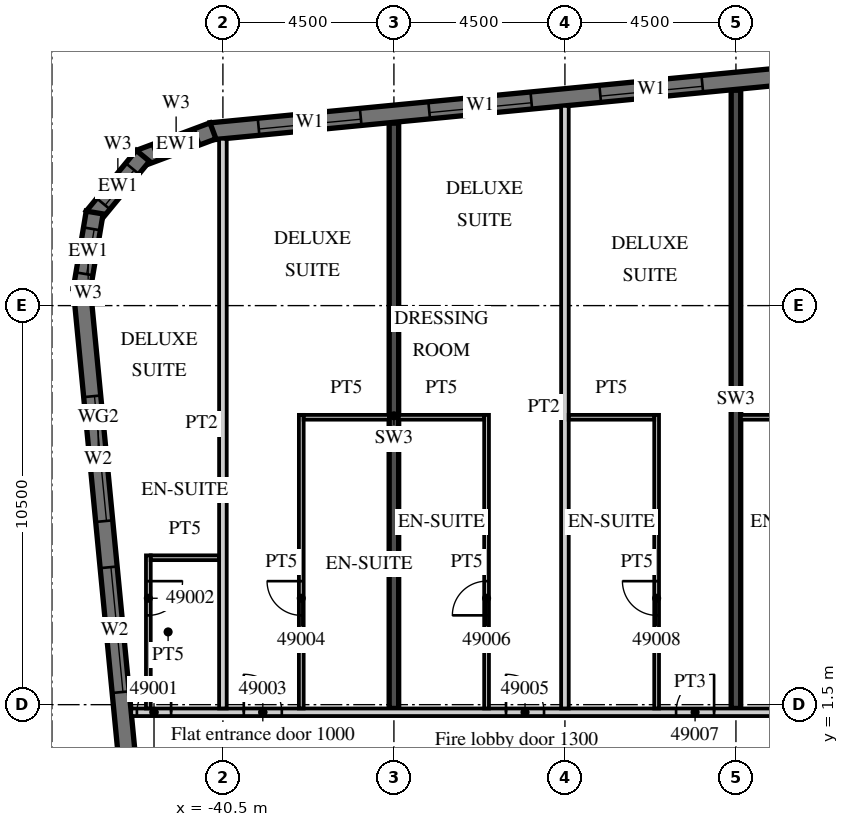
"""IFC4 building model, lengths in metres.
Left out: names, types, materials, properties, quantities, classifications, styles, units other than length and angle.
Written with IfcOpenShell. Run it as: python <this file> out.ifc"""

import sys

from ifc_helpers import new_model, si_unit, direction, frame, frame_2d, origin, place, context, subcontext, project, spatial, polyline, rectangle, outline, extrude, element, fill, save


model = new_model("IFC4")
c1 = context("Model", 3, precision=1e-05, world=origin(), true_north=direction((0.0, 1.0)))
c2 = subcontext(c1, "Body", "Model", "MODEL_VIEW")
j1 = project(units=[si_unit("LENGTHUNIT", "METRE"), si_unit("PLANEANGLEUNIT", "RADIAN")], contexts=[c1])
p1 = place(None, origin())
s1 = spatial("IfcSite", under=j1, at=p1, CompositionType="ELEMENT")
p2 = place(p1, origin())
s2 = spatial("IfcBuilding", under=s1, at=p2, CompositionType="ELEMENT")
p3 = place(p2, frame((0.0, 0.0, 203.2)))
s3 = spatial("IfcBuildingStorey", under=s2, at=p3, CompositionType="ELEMENT", Elevation=203.2)
p4 = place(p3, frame((-36.0, 1.4, 0.0), z_axis=(0.0, 0.0, 1.0), x_axis=(0.0, 1.0, 0.0)))
e1 = element("IfcWall", 1, at=p4, inside=s3, PredefinedType="SHEAR", context=c2, shape_type="SweptSolid", body=[
    extrude(rectangle(XDim=15.401, YDim=0.25, at=frame_2d((7.701, 0.0))), origin(), (0.0, 0.0, 1.0), 3.0),
])
p5 = place(p3, frame((-27.0, 1.4, 0.0), z_axis=(0.0, 0.0, 1.0), x_axis=(0.0, 1.0, 0.0)))
e2 = element("IfcWall", 2, at=p5, inside=s3, PredefinedType="SHEAR", context=c2, shape_type="SweptSolid", body=[
    extrude(rectangle(XDim=16.268, YDim=0.25, at=frame_2d((8.134, 0.0))), origin(), (0.0, 0.0, 1.0), 3.0),
])
p6 = place(p3, frame((-44.214, 12.466, 0.0), z_axis=(0.0, 0.0, 1.0), x_axis=(0.095847314626, -0.995396047952, 0.0)))
e3 = element("IfcWall", 3, at=p6, inside=s3, PredefinedType="SOLIDWALL", context=c2, shape_type="SweptSolid", body=[
    extrude(rectangle(XDim=34.0, YDim=0.45, at=frame_2d((17.0, 0.0))), origin(), (0.0, 0.0, 1.0), 3.0),
])
p7 = place(p6, frame((2.865, 0.0, 0.45)))
e4 = element("IfcOpeningElement", 4, at=p7, cuts=e3, PredefinedType="OPENING", context=c2, shape_type="SweptSolid", body=[
    extrude(rectangle(XDim=3.3, YDim=2.25, at=frame_2d((1.65, 1.125))), frame((0.0, 0.235, 0.0), z_axis=(0.0, -1.0, 0.0), x_axis=(1.0, 0.0, 0.0)), (0.0, 0.0, 1.0), 0.47),
])
p8 = place(p6, frame((7.386, 0.0, 0.45)))
e5 = element("IfcOpeningElement", 5, at=p8, cuts=e3, PredefinedType="OPENING", context=c2, shape_type="SweptSolid", body=[
    extrude(rectangle(XDim=3.3, YDim=2.25, at=frame_2d((1.65, 1.125))), frame((0.0, 0.235, 0.0), z_axis=(0.0, -1.0, 0.0), x_axis=(1.0, 0.0, 0.0)), (0.0, 0.0, 1.0), 0.47),
])
p9 = place(p3, frame((13.521, 21.817, 0.0), z_axis=(0.0, 0.0, 1.0), x_axis=(-0.995396508751, -0.095842529008, 0.0)))
e6 = element("IfcWall", 6, at=p9, inside=s3, PredefinedType="SOLIDWALL", context=c2, shape_type="SweptSolid", body=[
    extrude(rectangle(XDim=54.591, YDim=0.45, at=frame_2d((27.296, 0.0))), origin(), (0.0, 0.0, 1.0), 3.0),
])
p10 = place(p9, frame((0.91, 0.0, 0.45)))
e7 = element("IfcOpeningElement", 7, at=p10, cuts=e6, PredefinedType="OPENING", context=c2, shape_type="SweptSolid", body=[
    extrude(rectangle(XDim=2.7, YDim=2.25, at=frame_2d((1.35, 1.125))), frame((0.0, 0.235, 0.0), z_axis=(0.0, -1.0, 0.0), x_axis=(1.0, 0.0, 0.0)), (0.0, 0.0, 1.0), 0.47),
])
p11 = place(p9, frame((5.431, 0.0, 0.45)))
e8 = element("IfcOpeningElement", 8, at=p11, cuts=e6, PredefinedType="OPENING", context=c2, shape_type="SweptSolid", body=[
    extrude(rectangle(XDim=2.7, YDim=2.25, at=frame_2d((1.35, 1.125))), frame((0.0, 0.235, 0.0), z_axis=(0.0, -1.0, 0.0), x_axis=(1.0, 0.0, 0.0)), (0.0, 0.0, 1.0), 0.47),
])
p12 = place(p9, frame((9.952, 0.0, 0.45)))
e9 = element("IfcOpeningElement", 9, at=p12, cuts=e6, PredefinedType="OPENING", context=c2, shape_type="SweptSolid", body=[
    extrude(rectangle(XDim=2.7, YDim=2.25, at=frame_2d((1.35, 1.125))), frame((0.0, 0.235, 0.0), z_axis=(0.0, -1.0, 0.0), x_axis=(1.0, 0.0, 0.0)), (0.0, 0.0, 1.0), 0.47),
])
p13 = place(p9, frame((14.473, 0.0, 0.45)))
e10 = element("IfcOpeningElement", 10, at=p13, cuts=e6, PredefinedType="OPENING", context=c2, shape_type="SweptSolid", body=[
    extrude(rectangle(XDim=2.7, YDim=2.25, at=frame_2d((1.35, 1.125))), frame((0.0, 0.235, 0.0), z_axis=(0.0, -1.0, 0.0), x_axis=(1.0, 0.0, 0.0)), (0.0, 0.0, 1.0), 0.47),
])
p14 = place(p9, frame((18.994, 0.0, 0.45)))
e11 = element("IfcOpeningElement", 11, at=p14, cuts=e6, PredefinedType="OPENING", context=c2, shape_type="SweptSolid", body=[
    extrude(rectangle(XDim=2.7, YDim=2.25, at=frame_2d((1.35, 1.125))), frame((0.0, 0.235, 0.0), z_axis=(0.0, -1.0, 0.0), x_axis=(1.0, 0.0, 0.0)), (0.0, 0.0, 1.0), 0.47),
])
p15 = place(p9, frame((23.514, 0.0, 0.45)))
e12 = element("IfcOpeningElement", 12, at=p15, cuts=e6, PredefinedType="OPENING", context=c2, shape_type="SweptSolid", body=[
    extrude(rectangle(XDim=2.7, YDim=2.25, at=frame_2d((1.35, 1.125))), frame((0.0, 0.235, 0.0), z_axis=(0.0, -1.0, 0.0), x_axis=(1.0, 0.0, 0.0)), (0.0, 0.0, 1.0), 0.47),
])
p16 = place(p9, frame((28.035, 0.0, 0.45)))
e13 = element("IfcOpeningElement", 13, at=p16, cuts=e6, PredefinedType="OPENING", context=c2, shape_type="SweptSolid", body=[
    extrude(rectangle(XDim=2.7, YDim=2.25, at=frame_2d((1.35, 1.125))), frame((0.0, 0.235, 0.0), z_axis=(0.0, -1.0, 0.0), x_axis=(1.0, 0.0, 0.0)), (0.0, 0.0, 1.0), 0.47),
])
p17 = place(p9, frame((32.556, 0.0, 0.45)))
e14 = element("IfcOpeningElement", 14, at=p17, cuts=e6, PredefinedType="OPENING", context=c2, shape_type="SweptSolid", body=[
    extrude(rectangle(XDim=2.7, YDim=2.25, at=frame_2d((1.35, 1.125))), frame((0.0, 0.235, 0.0), z_axis=(0.0, -1.0, 0.0), x_axis=(1.0, 0.0, 0.0)), (0.0, 0.0, 1.0), 0.47),
])
p18 = place(p9, frame((37.077, 0.0, 0.45)))
e15 = element("IfcOpeningElement", 15, at=p18, cuts=e6, PredefinedType="OPENING", context=c2, shape_type="SweptSolid", body=[
    extrude(rectangle(XDim=2.7, YDim=2.25, at=frame_2d((1.35, 1.125))), frame((0.0, 0.235, 0.0), z_axis=(0.0, -1.0, 0.0), x_axis=(1.0, 0.0, 0.0)), (0.0, 0.0, 1.0), 0.47),
])
p19 = place(p9, frame((41.598, 0.0, 0.45)))
e16 = element("IfcOpeningElement", 16, at=p19, cuts=e6, PredefinedType="OPENING", context=c2, shape_type="SweptSolid", body=[
    extrude(rectangle(XDim=2.7, YDim=2.25, at=frame_2d((1.35, 1.125))), frame((0.0, 0.235, 0.0), z_axis=(0.0, -1.0, 0.0), x_axis=(1.0, 0.0, 0.0)), (0.0, 0.0, 1.0), 0.47),
])
p20 = place(p9, frame((46.118, 0.0, 0.45)))
e17 = element("IfcOpeningElement", 17, at=p20, cuts=e6, PredefinedType="OPENING", context=c2, shape_type="SweptSolid", body=[
    extrude(rectangle(XDim=2.7, YDim=2.25, at=frame_2d((1.35, 1.125))), frame((0.0, 0.235, 0.0), z_axis=(0.0, -1.0, 0.0), x_axis=(1.0, 0.0, 0.0)), (0.0, 0.0, 1.0), 0.47),
])
p21 = place(p9, frame((50.629, 0.0, 0.45)))
e18 = element("IfcOpeningElement", 18, at=p21, cuts=e6, PredefinedType="OPENING", context=c2, shape_type="SweptSolid", body=[
    extrude(rectangle(XDim=2.7, YDim=2.25, at=frame_2d((1.35, 1.125))), frame((0.0, 0.235, 0.0), z_axis=(0.0, -1.0, 0.0), x_axis=(1.0, 0.0, 0.0)), (0.0, 0.0, 1.0), 0.47),
])
p22 = place(p3, frame((-40.761, 16.598, 0.0), z_axis=(0.0, 0.0, 1.0), x_axis=(-0.936677599948, -0.350192909346, 0.0)))
e19 = element("IfcWall", 19, at=p22, inside=s3, PredefinedType="SOLIDWALL", context=c2, shape_type="SweptSolid", body=[
    extrude(outline(polyline([(0.0, -0.225), (2.071, -0.225), (1.95, 0.225), (0.121, 0.225), (0.0, -0.225)])), origin(), (0.0, 0.0, 1.0), 3.0),
])
p23 = place(p22, frame((0.435, 0.0, 0.45)))
e20 = element("IfcOpeningElement", 20, at=p23, cuts=e19, PredefinedType="OPENING", context=c2, shape_type="SweptSolid", body=[
    extrude(rectangle(XDim=1.2, YDim=2.25, at=frame_2d((0.6, 1.125))), frame((0.0, 0.235, 0.0), z_axis=(0.0, -1.0, 0.0), x_axis=(1.0, 0.0, 0.0)), (0.0, 0.0, 1.0), 0.47),
])
p24 = place(p3, frame((-42.606, 15.941, 0.0), z_axis=(0.0, 0.0, 1.0), x_axis=(-0.636116318187, -0.771593176315, 0.0)))
e21 = element("IfcWall", 21, at=p24, inside=s3, PredefinedType="SOLIDWALL", context=c2, shape_type="SweptSolid", body=[
    extrude(outline(polyline([(0.0, -0.225), (2.071, -0.225), (1.95, 0.225), (0.121, 0.225), (0.0, -0.225)])), origin(), (0.0, 0.0, 1.0), 3.0),
])
p25 = place(p24, frame((0.435, 0.0, 0.45)))
e22 = element("IfcOpeningElement", 22, at=p25, cuts=e21, PredefinedType="OPENING", context=c2, shape_type="SweptSolid", body=[
    extrude(rectangle(XDim=1.2, YDim=2.25, at=frame_2d((0.6, 1.125))), frame((0.0, 0.235, 0.0), z_axis=(0.0, -1.0, 0.0), x_axis=(1.0, 0.0, 0.0)), (0.0, 0.0, 1.0), 0.47),
])
p26 = place(p3, frame((-43.875, 14.449, 0.0), z_axis=(0.0, 0.0, 1.0), x_axis=(-0.164953448126, -0.986301353518, 0.0)))
e23 = element("IfcWall", 23, at=p26, inside=s3, PredefinedType="SOLIDWALL", context=c2, shape_type="SweptSolid", body=[
    extrude(outline(polyline([(0.0, -0.225), (2.071, -0.225), (1.95, 0.225), (0.121, 0.225), (0.0, -0.225)])), origin(), (0.0, 0.0, 1.0), 3.0),
])
p27 = place(p26, frame((0.435, 0.0, 0.45)))
e24 = element("IfcOpeningElement", 24, at=p27, cuts=e23, PredefinedType="OPENING", context=c2, shape_type="SweptSolid", body=[
    extrude(rectangle(XDim=1.2, YDim=2.25, at=frame_2d((0.6, 1.125))), frame((0.0, 0.235, 0.0), z_axis=(0.0, -1.0, 0.0), x_axis=(1.0, 0.0, 0.0)), (0.0, 0.0, 1.0), 0.47),
])
p28 = place(p3, frame((-42.913, 1.3, 0.0), z_axis=(0.0, 0.0, 1.0), x_axis=(1.0, 0.0, 0.0)))
e25 = element("IfcWall", 25, at=p28, inside=s3, PredefinedType="PARTITIONING", context=c2, shape_type="SweptSolid", body=[
    extrude(rectangle(XDim=29.413, YDim=0.2, at=frame_2d((14.707, 0.0))), origin(), (0.0, 0.0, 1.0), 3.0),
])
p29 = place(p28, frame((0.15, 0.0, 0.0)))
e26 = element("IfcOpeningElement", 26, at=p29, cuts=e25, PredefinedType="OPENING", context=c2, shape_type="SweptSolid", body=[
    extrude(rectangle(XDim=0.9, YDim=2.1, at=frame_2d((0.45, 1.05))), frame((0.0, 0.11, 0.0), z_axis=(0.0, -1.0, 0.0), x_axis=(1.0, 0.0, 0.0)), (0.0, 0.0, 1.0), 0.22),
])
p30 = place(p28, frame((2.963, 0.0, 0.0)))
e27 = element("IfcOpeningElement", 27, at=p30, cuts=e25, PredefinedType="OPENING", context=c2, shape_type="SweptSolid", body=[
    extrude(rectangle(XDim=1.0, YDim=2.1, at=frame_2d((0.5, 1.05))), frame((0.0, 0.11, 0.0), z_axis=(0.0, -1.0, 0.0), x_axis=(1.0, 0.0, 0.0)), (0.0, 0.0, 1.0), 0.22),
])
p31 = place(p28, frame((9.863, 0.0, 0.0)))
e28 = element("IfcOpeningElement", 28, at=p31, cuts=e25, PredefinedType="OPENING", context=c2, shape_type="SweptSolid", body=[
    extrude(rectangle(XDim=1.0, YDim=2.1, at=frame_2d((0.5, 1.05))), frame((0.0, 0.11, 0.0), z_axis=(0.0, -1.0, 0.0), x_axis=(1.0, 0.0, 0.0)), (0.0, 0.0, 1.0), 0.22),
])
p32 = place(p28, frame((14.338, 0.0, 0.0)))
e29 = element("IfcOpeningElement", 29, at=p32, cuts=e25, PredefinedType="OPENING", context=c2, shape_type="SweptSolid", body=[
    extrude(rectangle(XDim=1.0, YDim=2.1, at=frame_2d((0.5, 1.05))), frame((0.0, 0.11, 0.0), z_axis=(0.0, -1.0, 0.0), x_axis=(1.0, 0.0, 0.0)), (0.0, 0.0, 1.0), 0.22),
])
p33 = place(p28, frame((21.275, 0.0, 0.0)))
e30 = element("IfcOpeningElement", 30, at=p33, cuts=e25, PredefinedType="OPENING", context=c2, shape_type="SweptSolid", body=[
    extrude(rectangle(XDim=1.2, YDim=2.1, at=frame_2d((0.6, 1.05))), frame((0.0, 0.11, 0.0), z_axis=(0.0, -1.0, 0.0), x_axis=(1.0, 0.0, 0.0)), (0.0, 0.0, 1.0), 0.22),
])
p34 = place(p28, frame((25.488, 0.0, 0.0)))
e31 = element("IfcOpeningElement", 31, at=p34, cuts=e25, PredefinedType="OPENING", context=c2, shape_type="SweptSolid", body=[
    extrude(rectangle(XDim=1.0, YDim=2.1, at=frame_2d((0.5, 1.05))), frame((0.0, 0.11, 0.0), z_axis=(0.0, -1.0, 0.0), x_axis=(1.0, 0.0, 0.0)), (0.0, 0.0, 1.0), 0.22),
])
p35 = place(p3, frame((-40.5, 1.4, 0.0), z_axis=(0.0, 0.0, 1.0), x_axis=(0.0, 1.0, 0.0)))
e32 = element("IfcWall", 32, at=p35, inside=s3, PredefinedType="PARTITIONING", context=c2, shape_type="SweptSolid", body=[
    extrude(rectangle(XDim=14.99, YDim=0.2, at=frame_2d((7.495, 0.0))), origin(), (0.0, 0.0, 1.0), 3.0),
])
p36 = place(p3, frame((-42.462, 1.4, 0.0), z_axis=(0.0, 0.0, 1.0), x_axis=(0.0, 1.0, 0.0)))
e33 = element("IfcWall", 33, at=p36, inside=s3, PredefinedType="PARTITIONING", context=c2, shape_type="SweptSolid", body=[
    extrude(rectangle(XDim=4.028, YDim=0.125, at=frame_2d((2.014, 0.0))), origin(), (0.0, 0.0, 1.0), 3.0),
])
p37 = place(p36, frame((2.45, 0.0, 0.0)))
e34 = element("IfcOpeningElement", 34, at=p37, cuts=e33, PredefinedType="OPENING", context=c2, shape_type="SweptSolid", body=[
    extrude(rectangle(XDim=0.9, YDim=2.1, at=frame_2d((0.45, 1.05))), frame((0.0, 0.073, 0.0), z_axis=(0.0, -1.0, 0.0), x_axis=(1.0, 0.0, 0.0)), (0.0, 0.0, 1.0), 0.145),
])
p38 = place(p3, frame((-42.4, 5.366, 0.0), z_axis=(0.0, 0.0, 1.0), x_axis=(1.0, 0.0, 0.0)))
e35 = element("IfcWall", 35, at=p38, inside=s3, PredefinedType="PARTITIONING", context=c2, shape_type="SweptSolid", body=[
    extrude(rectangle(XDim=1.8, YDim=0.125, at=frame_2d((0.9, 0.0))), origin(), (0.0, 0.0, 1.0), 3.0),
])
p39 = place(p3, frame((-38.438, 1.4, 0.0), z_axis=(0.0, 0.0, 1.0), x_axis=(0.0, 1.0, 0.0)))
e36 = element("IfcWall", 36, at=p39, inside=s3, PredefinedType="PARTITIONING", context=c2, shape_type="SweptSolid", body=[
    extrude(rectangle(XDim=7.725, YDim=0.125, at=frame_2d((3.863, 0.0))), origin(), (0.0, 0.0, 1.0), 3.0),
])
p40 = place(p39, frame((2.45, 0.0, 0.0)))
e37 = element("IfcOpeningElement", 37, at=p40, cuts=e36, PredefinedType="OPENING", context=c2, shape_type="SweptSolid", body=[
    extrude(rectangle(XDim=0.9, YDim=2.1, at=frame_2d((0.45, 1.05))), frame((0.0, 0.073, 0.0), z_axis=(0.0, -1.0, 0.0), x_axis=(1.0, 0.0, 0.0)), (0.0, 0.0, 1.0), 0.145),
])
p41 = place(p3, frame((-38.375, 9.062, 0.0), z_axis=(0.0, 0.0, 1.0), x_axis=(1.0, 0.0, 0.0)))
e38 = element("IfcWall", 38, at=p41, inside=s3, PredefinedType="PARTITIONING", context=c2, shape_type="SweptSolid", body=[
    extrude(rectangle(XDim=2.25, YDim=0.125, at=frame_2d((1.125, 0.0))), origin(), (0.0, 0.0, 1.0), 3.0),
])
p42 = place(p3, frame((-31.5, 1.4, 0.0), z_axis=(0.0, 0.0, 1.0), x_axis=(0.0, 1.0, 0.0)))
e39 = element("IfcWall", 39, at=p42, inside=s3, PredefinedType="PARTITIONING", context=c2, shape_type="SweptSolid", body=[
    extrude(rectangle(XDim=15.856, YDim=0.2, at=frame_2d((7.928, 0.0))), origin(), (0.0, 0.0, 1.0), 3.0),
])
p43 = place(p3, frame((-33.562, 1.4, 0.0), z_axis=(0.0, 0.0, 1.0), x_axis=(0.0, 1.0, 0.0)))
e40 = element("IfcWall", 40, at=p43, inside=s3, PredefinedType="PARTITIONING", context=c2, shape_type="SweptSolid", body=[
    extrude(rectangle(XDim=7.725, YDim=0.125, at=frame_2d((3.863, 0.0))), origin(), (0.0, 0.0, 1.0), 3.0),
])
p44 = place(p43, frame((2.45, 0.0, 0.0)))
e41 = element("IfcOpeningElement", 41, at=p44, cuts=e40, PredefinedType="OPENING", context=c2, shape_type="SweptSolid", body=[
    extrude(rectangle(XDim=0.9, YDim=2.1, at=frame_2d((0.45, 1.05))), frame((0.0, 0.073, 0.0), z_axis=(0.0, -1.0, 0.0), x_axis=(1.0, 0.0, 0.0)), (0.0, 0.0, 1.0), 0.145),
])
p45 = place(p3, frame((-35.875, 9.062, 0.0), z_axis=(0.0, 0.0, 1.0), x_axis=(1.0, 0.0, 0.0)))
e42 = element("IfcWall", 42, at=p45, inside=s3, PredefinedType="PARTITIONING", context=c2, shape_type="SweptSolid", body=[
    extrude(rectangle(XDim=2.25, YDim=0.125, at=frame_2d((1.125, 0.0))), origin(), (0.0, 0.0, 1.0), 3.0),
])
p46 = place(p3, frame((-29.087, 1.4, 0.0), z_axis=(0.0, 0.0, 1.0), x_axis=(0.0, 1.0, 0.0)))
e43 = element("IfcWall", 43, at=p46, inside=s3, PredefinedType="PARTITIONING", context=c2, shape_type="SweptSolid", body=[
    extrude(rectangle(XDim=7.725, YDim=0.125, at=frame_2d((3.863, 0.0))), origin(), (0.0, 0.0, 1.0), 3.0),
])
p47 = place(p46, frame((2.45, 0.0, 0.0)))
e44 = element("IfcOpeningElement", 44, at=p47, cuts=e43, PredefinedType="OPENING", context=c2, shape_type="SweptSolid", body=[
    extrude(rectangle(XDim=0.9, YDim=2.1, at=frame_2d((0.45, 1.05))), frame((0.0, 0.073, 0.0), z_axis=(0.0, -1.0, 0.0), x_axis=(1.0, 0.0, 0.0)), (0.0, 0.0, 1.0), 0.145),
])
p48 = place(p3, frame((-31.4, 9.062, 0.0), z_axis=(0.0, 0.0, 1.0), x_axis=(1.0, 0.0, 0.0)))
e45 = element("IfcWall", 45, at=p48, inside=s3, PredefinedType="PARTITIONING", context=c2, shape_type="SweptSolid", body=[
    extrude(rectangle(XDim=2.25, YDim=0.125, at=frame_2d((1.125, 0.0))), origin(), (0.0, 0.0, 1.0), 3.0),
])
p49 = place(p3, frame((-26.875, 9.062, 0.0), z_axis=(0.0, 0.0, 1.0), x_axis=(1.0, 0.0, 0.0)))
e46 = element("IfcWall", 46, at=p49, inside=s3, PredefinedType="PARTITIONING", context=c2, shape_type="SweptSolid", body=[
    extrude(rectangle(XDim=2.8, YDim=0.125, at=frame_2d((1.4, 0.0))), origin(), (0.0, 0.0, 1.0), 3.0),
])
p50 = place(p7, origin())
e47 = element("IfcWindow", 47, at=p50, inside=s3, PartitioningType="SINGLE_PANEL", PredefinedType="WINDOW", context=c2, shape_type="SweptSolid", body=[
    extrude(rectangle(XDim=3.3, YDim=2.25, at=frame_2d((1.65, 1.125))), frame((0.0, 0.09, 0.0), z_axis=(0.0, -1.0, 0.0), x_axis=(1.0, 0.0, 0.0)), (0.0, 0.0, 1.0), 0.06),
])
fill(e4, e47)
p51 = place(p8, origin())
e48 = element("IfcWindow", 48, at=p51, inside=s3, PartitioningType="SINGLE_PANEL", PredefinedType="WINDOW", context=c2, shape_type="SweptSolid", body=[
    extrude(rectangle(XDim=3.3, YDim=2.25, at=frame_2d((1.65, 1.125))), frame((0.0, 0.09, 0.0), z_axis=(0.0, -1.0, 0.0), x_axis=(1.0, 0.0, 0.0)), (0.0, 0.0, 1.0), 0.06),
])
fill(e5, e48)
p52 = place(p19, origin())
e49 = element("IfcWindow", 49, at=p52, inside=s3, PartitioningType="SINGLE_PANEL", PredefinedType="WINDOW", context=c2, shape_type="SweptSolid", body=[
    extrude(rectangle(XDim=2.7, YDim=2.25, at=frame_2d((1.35, 1.125))), frame((0.0, 0.09, 0.0), z_axis=(0.0, -1.0, 0.0), x_axis=(1.0, 0.0, 0.0)), (0.0, 0.0, 1.0), 0.06),
])
fill(e16, e49)
p53 = place(p20, origin())
e50 = element("IfcWindow", 50, at=p53, inside=s3, PartitioningType="SINGLE_PANEL", PredefinedType="WINDOW", context=c2, shape_type="SweptSolid", body=[
    extrude(rectangle(XDim=2.7, YDim=2.25, at=frame_2d((1.35, 1.125))), frame((0.0, 0.09, 0.0), z_axis=(0.0, -1.0, 0.0), x_axis=(1.0, 0.0, 0.0)), (0.0, 0.0, 1.0), 0.06),
])
fill(e17, e50)
p54 = place(p21, origin())
e51 = element("IfcWindow", 51, at=p54, inside=s3, PartitioningType="SINGLE_PANEL", PredefinedType="WINDOW", context=c2, shape_type="SweptSolid", body=[
    extrude(rectangle(XDim=2.7, YDim=2.25, at=frame_2d((1.35, 1.125))), frame((0.0, 0.09, 0.0), z_axis=(0.0, -1.0, 0.0), x_axis=(1.0, 0.0, 0.0)), (0.0, 0.0, 1.0), 0.06),
])
fill(e18, e51)
p55 = place(p23, origin())
e52 = element("IfcWindow", 52, at=p55, inside=s3, PartitioningType="SINGLE_PANEL", PredefinedType="WINDOW", context=c2, shape_type="SweptSolid", body=[
    extrude(rectangle(XDim=1.2, YDim=2.25, at=frame_2d((0.6, 1.125))), frame((0.0, 0.09, 0.0), z_axis=(0.0, -1.0, 0.0), x_axis=(1.0, 0.0, 0.0)), (0.0, 0.0, 1.0), 0.06),
])
fill(e20, e52)
p56 = place(p25, origin())
e53 = element("IfcWindow", 53, at=p56, inside=s3, PartitioningType="SINGLE_PANEL", PredefinedType="WINDOW", context=c2, shape_type="SweptSolid", body=[
    extrude(rectangle(XDim=1.2, YDim=2.25, at=frame_2d((0.6, 1.125))), frame((0.0, 0.09, 0.0), z_axis=(0.0, -1.0, 0.0), x_axis=(1.0, 0.0, 0.0)), (0.0, 0.0, 1.0), 0.06),
])
fill(e22, e53)
p57 = place(p27, origin())
e54 = element("IfcWindow", 54, at=p57, inside=s3, PartitioningType="SINGLE_PANEL", PredefinedType="WINDOW", context=c2, shape_type="SweptSolid", body=[
    extrude(rectangle(XDim=1.2, YDim=2.25, at=frame_2d((0.6, 1.125))), frame((0.0, 0.09, 0.0), z_axis=(0.0, -1.0, 0.0), x_axis=(1.0, 0.0, 0.0)), (0.0, 0.0, 1.0), 0.06),
])
fill(e24, e54)
p58 = place(p29, origin())
e55 = element("IfcDoor", 55, at=p58, inside=s3, OperationType="SINGLE_SWING_RIGHT", PredefinedType="DOOR", context=c2, shape_type="SweptSolid", body=[
    extrude(rectangle(XDim=0.9, YDim=2.1, at=frame_2d((0.45, 1.05))), frame((0.0, 0.025, 0.0), z_axis=(0.0, -1.0, 0.0), x_axis=(1.0, 0.0, 0.0)), (0.0, 0.0, 1.0), 0.05),
])
fill(e26, e55)
p59 = place(p37, origin())
e56 = element("IfcDoor", 56, at=p59, inside=s3, OperationType="SINGLE_SWING_RIGHT", PredefinedType="DOOR", context=c2, shape_type="SweptSolid", body=[
    extrude(rectangle(XDim=0.9, YDim=2.1, at=frame_2d((0.45, 1.05))), frame((0.0, 0.025, 0.0), z_axis=(0.0, -1.0, 0.0), x_axis=(1.0, 0.0, 0.0)), (0.0, 0.0, 1.0), 0.05),
])
fill(e34, e56)
p60 = place(p30, origin())
e57 = element("IfcDoor", 57, at=p60, inside=s3, OperationType="SINGLE_SWING_LEFT", PredefinedType="DOOR", context=c2, shape_type="SweptSolid", body=[
    extrude(rectangle(XDim=1.0, YDim=2.1, at=frame_2d((0.5, 1.05))), frame((0.0, 0.025, 0.0), z_axis=(0.0, -1.0, 0.0), x_axis=(1.0, 0.0, 0.0)), (0.0, 0.0, 1.0), 0.05),
])
fill(e27, e57)
p61 = place(p40, origin())
e58 = element("IfcDoor", 58, at=p61, inside=s3, OperationType="SINGLE_SWING_RIGHT", PredefinedType="DOOR", context=c2, shape_type="SweptSolid", body=[
    extrude(rectangle(XDim=0.9, YDim=2.1, at=frame_2d((0.45, 1.05))), frame((0.0, 0.025, 0.0), z_axis=(0.0, -1.0, 0.0), x_axis=(1.0, 0.0, 0.0)), (0.0, 0.0, 1.0), 0.05),
])
fill(e37, e58)
p62 = place(p31, origin())
e59 = element("IfcDoor", 59, at=p62, inside=s3, OperationType="SINGLE_SWING_LEFT", PredefinedType="DOOR", context=c2, shape_type="SweptSolid", body=[
    extrude(rectangle(XDim=1.0, YDim=2.1, at=frame_2d((0.5, 1.05))), frame((0.0, 0.025, 0.0), z_axis=(0.0, -1.0, 0.0), x_axis=(1.0, 0.0, 0.0)), (0.0, 0.0, 1.0), 0.05),
])
fill(e28, e59)
p63 = place(p44, origin())
e60 = element("IfcDoor", 60, at=p63, inside=s3, OperationType="SINGLE_SWING_LEFT", PredefinedType="DOOR", context=c2, shape_type="SweptSolid", body=[
    extrude(rectangle(XDim=0.9, YDim=2.1, at=frame_2d((0.45, 1.05))), frame((0.0, 0.025, 0.0), z_axis=(0.0, -1.0, 0.0), x_axis=(1.0, 0.0, 0.0)), (0.0, 0.0, 1.0), 0.05),
])
fill(e41, e60)
p64 = place(p32, origin())
e61 = element("IfcDoor", 61, at=p64, inside=s3, OperationType="SINGLE_SWING_RIGHT", PredefinedType="DOOR", context=c2, shape_type="SweptSolid", body=[
    extrude(rectangle(XDim=1.0, YDim=2.1, at=frame_2d((0.5, 1.05))), frame((0.0, 0.025, 0.0), z_axis=(0.0, -1.0, 0.0), x_axis=(1.0, 0.0, 0.0)), (0.0, 0.0, 1.0), 0.05),
])
fill(e29, e61)
p65 = place(p47, origin())
e62 = element("IfcDoor", 62, at=p65, inside=s3, OperationType="SINGLE_SWING_RIGHT", PredefinedType="DOOR", context=c2, shape_type="SweptSolid", body=[
    extrude(rectangle(XDim=0.9, YDim=2.1, at=frame_2d((0.45, 1.05))), frame((0.0, 0.025, 0.0), z_axis=(0.0, -1.0, 0.0), x_axis=(1.0, 0.0, 0.0)), (0.0, 0.0, 1.0), 0.05),
])
fill(e44, e62)
save(model, sys.argv[1])
